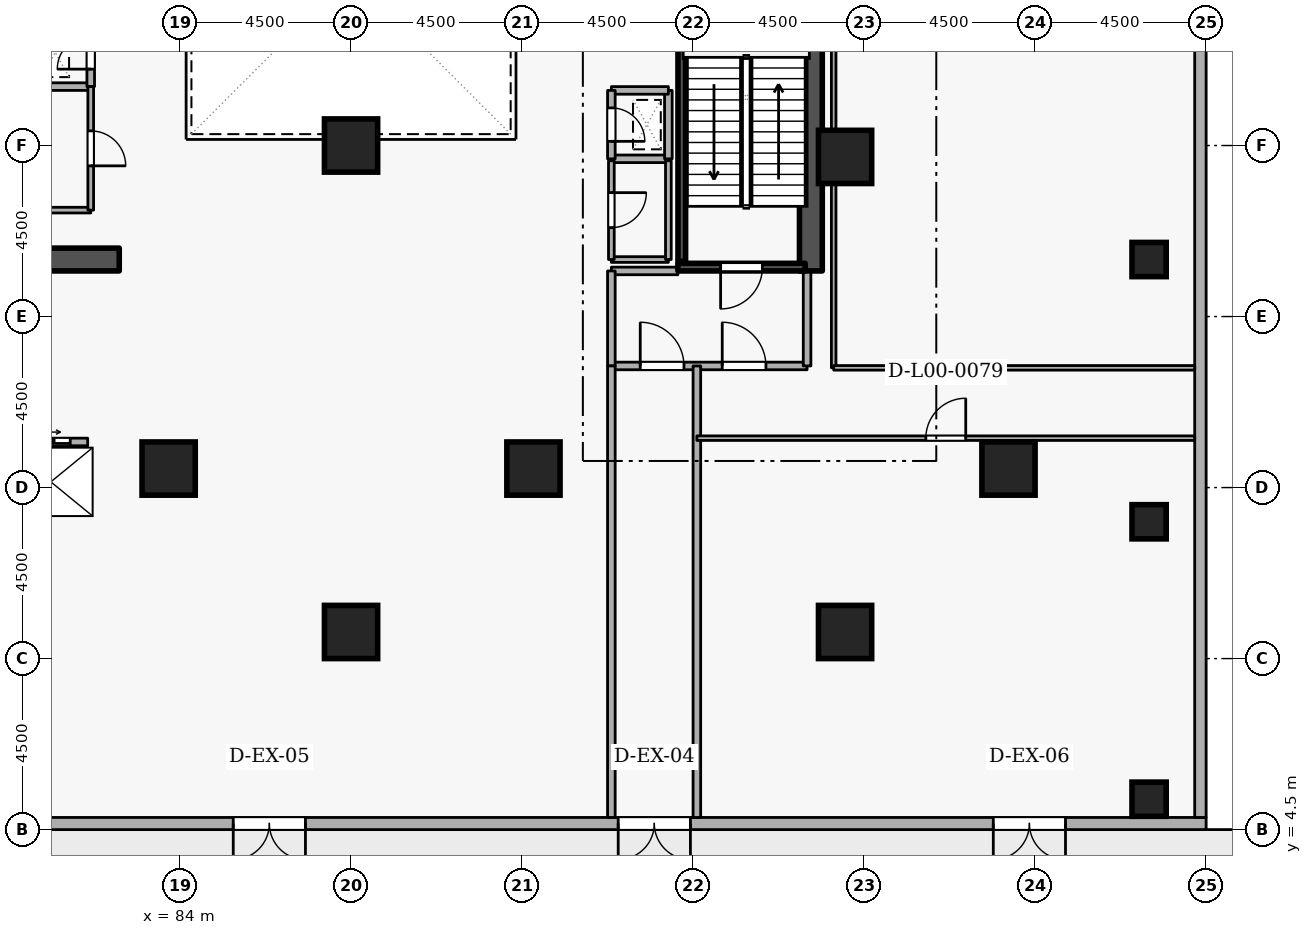
"""IFC4 building model, lengths in metres.
Left out: names, types, materials, properties, quantities, classifications, styles, units other than length and angle.
Written with IfcOpenShell. Run it as: python <this file> out.ifc"""

import sys

from ifc_helpers import new_model, si_unit, direction, frame, frame_2d, origin, origin_2d, place, context, subcontext, project, spatial, rectangle, extrude, element, fill, save


model = new_model("IFC4")
c1 = context("Model", 3, precision=1e-05, world=origin(), true_north=direction((0.0, 1.0)))
c2 = subcontext(c1, "Body", "Model", "MODEL_VIEW")
j1 = project(units=[si_unit("LENGTHUNIT", "METRE"), si_unit("PLANEANGLEUNIT", "RADIAN")], contexts=[c1])
p1 = place(None, origin())
s1 = spatial("IfcSite", under=j1, at=p1, CompositionType="ELEMENT")
p2 = place(p1, origin())
s2 = spatial("IfcBuilding", under=s1, at=p2, CompositionType="ELEMENT")
p3 = place(p2, origin())
s3 = spatial("IfcBuildingStorey", under=s2, at=p3, CompositionType="ELEMENT", Elevation=0.0)
p4 = place(p3, frame((100.6, 19.2, 0.0), z_axis=(0.0, 0.0, 1.0), x_axis=(0.0, 1.0, 0.0)))
e1 = element("IfcWall", 1, at=p4, inside=s3, PredefinedType="SHEAR", context=c2, shape_type="SweptSolid", body=[
    extrude(rectangle(XDim=15.6, YDim=0.6, at=frame_2d((7.8, 0.0))), origin(), (0.0, 0.0, 1.0), 4.8),
])
p5 = place(p3, frame((76.7, 19.5, 0.0), z_axis=(0.0, 0.0, 1.0), x_axis=(1.0, 0.0, 0.0)))
e2 = element("IfcWall", 2, at=p5, inside=s3, PredefinedType="SHEAR", context=c2, shape_type="SweptSolid", body=[
    extrude(rectangle(XDim=5.7, YDim=0.6, at=frame_2d((2.85, 0.0))), origin(), (0.0, 0.0, 1.0), 4.8),
])
for number, where, z_axis, x_axis in (
    (3, (105.8, 14.0, 0.0), (0.0, 0.0, 1.0), (1.0, 0.0, 0.0)),
    (4, (101.5, 9.7, 0.0), (0.0, 0.0, 1.0), (1.0, 0.0, 0.0)),
    (5, (88.5, 9.7, 0.0), (0.0, 0.0, 1.0), (1.0, 0.0, 0.0)),
    (6, (93.3, 14.0, 0.0), (0.0, 0.0, 1.0), (1.0, 0.0, 0.0)),
    (7, (83.7, 14.0, 0.0), (0.0, 0.0, 1.0), (1.0, 0.0, 0.0)),
    (8, (101.5, 22.2, 0.0), (0.0, 0.0, 1.0), (1.0, 0.0, 0.0)),
    (9, (88.5, 22.5, 0.0), (0.0, 0.0, 1.0), (1.0, 0.0, 0.0)),
):
    element("IfcColumn", number, at=place(p3, frame(where, z_axis=z_axis, x_axis=x_axis)), inside=s3, PredefinedType="COLUMN", context=c2, shape_type="SweptSolid", body=[
        extrude(rectangle(XDim=1.4, YDim=1.4, at=origin_2d()), origin(), (0.0, 0.0, 1.0), 4.8),
    ])
for number, where, z_axis, x_axis in (
    (10, (109.5, 5.3, 0.0), (0.0, 0.0, 1.0), (1.0, 0.0, 0.0)),
    (11, (109.5, 12.6, 0.0), (0.0, 0.0, 1.0), (1.0, 0.0, 0.0)),
    (12, (109.5, 19.5, 0.0), (0.0, 0.0, 1.0), (1.0, 0.0, 0.0)),
):
    element("IfcColumn", number, at=place(p3, frame(where, z_axis=z_axis, x_axis=x_axis)), inside=s3, PredefinedType="COLUMN", context=c2, shape_type="SweptSolid", body=[
        extrude(rectangle(XDim=0.9, YDim=0.9, at=origin_2d()), origin(), (0.0, 0.0, 1.0), 4.8),
    ])
p6 = place(p3, frame((71.6, 4.66, 0.0), z_axis=(0.0, 0.0, 1.0), x_axis=(1.0, 0.0, 0.0)))
e13 = element("IfcWall", 13, at=p6, inside=s3, PredefinedType="STANDARD", context=c2, shape_type="SweptSolid", body=[
    extrude(rectangle(XDim=39.4, YDim=0.32, at=frame_2d((19.7, 0.0))), origin(), (0.0, 0.0, 1.0), 3.86),
])
p7 = place(p6, frame((25.83, 0.0, 0.0), z_axis=(0.0, 0.0, 1.0), x_axis=(-1.0, 0.0, 0.0)))
e14 = element("IfcOpeningElement", 14, at=p7, cuts=e13, PredefinedType="OPENING", context=c2, shape_type="SweptSolid", body=[
    extrude(rectangle(XDim=1.9, YDim=2.25, at=frame_2d((0.95, 1.125))), frame((0.0, 0.17, 0.0), z_axis=(0.0, -1.0, 0.0), x_axis=(1.0, 0.0, 0.0)), (0.0, 0.0, 1.0), 0.34),
])
p8 = place(p6, frame((15.7, 0.0, 0.0), z_axis=(0.0, 0.0, 1.0), x_axis=(-1.0, 0.0, 0.0)))
e15 = element("IfcOpeningElement", 15, at=p8, cuts=e13, PredefinedType="OPENING", context=c2, shape_type="SweptSolid", body=[
    extrude(rectangle(XDim=1.9, YDim=2.25, at=frame_2d((0.95, 1.125))), frame((0.0, 0.17, 0.0), z_axis=(0.0, -1.0, 0.0), x_axis=(1.0, 0.0, 0.0)), (0.0, 0.0, 1.0), 0.34),
])
p9 = place(p6, frame((35.7, 0.0, 0.0), z_axis=(0.0, 0.0, 1.0), x_axis=(-1.0, 0.0, 0.0)))
e16 = element("IfcOpeningElement", 16, at=p9, cuts=e13, PredefinedType="OPENING", context=c2, shape_type="SweptSolid", body=[
    extrude(rectangle(XDim=1.9, YDim=2.25, at=frame_2d((0.95, 1.125))), frame((0.0, 0.17, 0.0), z_axis=(0.0, -1.0, 0.0), x_axis=(1.0, 0.0, 0.0)), (0.0, 0.0, 1.0), 0.34),
])
p10 = place(p6, frame((3.0, 0.0, 0.78)))
e17 = element("IfcOpeningElement", 17, at=p10, cuts=e13, PredefinedType="OPENING", context=c2, shape_type="SweptSolid", body=[
    extrude(rectangle(XDim=2.1, YDim=2.4, at=frame_2d((1.05, 1.2))), frame((0.0, 0.17, 0.0), z_axis=(0.0, -1.0, 0.0), x_axis=(1.0, 0.0, 0.0)), (0.0, 0.0, 1.0), 0.34),
])
p11 = place(p3, frame((110.85, 4.82, 0.0), z_axis=(0.0, 0.0, 1.0), x_axis=(0.0, 1.0, 0.0)))
e18 = element("IfcWall", 18, at=p11, inside=s3, PredefinedType="STANDARD", context=c2, shape_type="SweptSolid", body=[
    extrude(rectangle(XDim=44.36, YDim=0.3, at=frame_2d((22.18, 0.0))), origin(), (0.0, 0.0, 1.0), 3.86),
])
p12 = place(p11, frame((22.9, 0.0, 0.0), z_axis=(0.0, 0.0, 1.0), x_axis=(-1.0, 0.0, 0.0)))
e19 = element("IfcOpeningElement", 19, at=p12, cuts=e18, PredefinedType="OPENING", context=c2, shape_type="SweptSolid", body=[
    extrude(rectangle(XDim=1.9, YDim=2.25, at=frame_2d((0.95, 1.125))), frame((0.0, 0.16, 0.0), z_axis=(0.0, -1.0, 0.0), x_axis=(1.0, 0.0, 0.0)), (0.0, 0.0, 1.0), 0.32),
])
p13 = place(p3, frame((79.63, 14.7, 0.0), z_axis=(0.0, 0.0, 1.0), x_axis=(1.0, 0.0, 0.0)))
e20 = element("IfcWall", 20, at=p13, inside=s3, PredefinedType="STANDARD", context=c2, shape_type="SweptSolid", body=[
    extrude(rectangle(XDim=1.94, YDim=0.2, at=frame_2d((0.97, 0.0))), origin(), (0.0, 0.0, 1.0), 4.46),
])
p14 = place(p13, frame((0.46, 0.0, 0.0)))
e21 = element("IfcOpeningElement", 21, at=p14, cuts=e20, PredefinedType="OPENING", context=c2, shape_type="SweptSolid", body=[
    extrude(rectangle(XDim=1.02, YDim=2.06, at=frame_2d((0.51, 1.03))), frame((0.0, 0.11, 0.0), z_axis=(0.0, -1.0, 0.0), x_axis=(1.0, 0.0, 0.0)), (0.0, 0.0, 1.0), 0.22),
])
p15 = place(p3, frame((100.45, 19.3, 0.0), z_axis=(0.0, 0.0, 1.0), x_axis=(-1.0, 0.0, 0.0)))
e22 = element("IfcWall", 22, at=p15, inside=s3, PredefinedType="SHEAR", context=c2, shape_type="SweptSolid", body=[
    extrude(rectangle(XDim=3.35, YDim=0.2, at=frame_2d((1.675, 0.0))), origin(), (0.0, 0.0, 1.0), 4.8),
])
p16 = place(p15, frame((1.125, 0.0, 0.0)))
e23 = element("IfcOpeningElement", 23, at=p16, cuts=e22, PredefinedType="OPENING", context=c2, shape_type="SweptSolid", body=[
    extrude(rectangle(XDim=1.1, YDim=2.1, at=frame_2d((0.55, 1.05))), frame((0.0, 0.11, 0.0), z_axis=(0.0, -1.0, 0.0), x_axis=(1.0, 0.0, 0.0)), (0.0, 0.0, 1.0), 0.22),
])
p17 = place(p3, frame((97.203, 26.55, 0.0), z_axis=(0.0, 0.0, 1.0), x_axis=(0.0, -1.0, 0.0)))
e24 = element("IfcWall", 24, at=p17, inside=s3, PredefinedType="SHEAR", context=c2, shape_type="SweptSolid", body=[
    extrude(rectangle(XDim=7.1, YDim=0.2, at=frame_2d((3.55, 0.0))), origin(), (0.0, 0.0, 1.0), 4.8),
])
p18 = place(p3, frame((95.35, 16.7, 0.0), z_axis=(0.0, 0.0, 1.0), x_axis=(1.0, 0.0, 0.0)))
e25 = element("IfcWall", 25, at=p18, inside=s3, PredefinedType="STANDARD", context=c2, shape_type="SweptSolid", body=[
    extrude(rectangle(XDim=5.15, YDim=0.2, at=frame_2d((2.575, 0.0))), origin(), (0.0, 0.0, 1.0), 4.46),
])
p19 = place(p18, frame((2.917, 0.0, 0.0)))
e26 = element("IfcOpeningElement", 26, at=p19, cuts=e25, PredefinedType="OPENING", context=c2, shape_type="SweptSolid", body=[
    extrude(rectangle(XDim=1.15, YDim=2.1, at=frame_2d((0.575, 1.05))), frame((0.0, 0.11, 0.0), z_axis=(0.0, -1.0, 0.0), x_axis=(1.0, 0.0, 0.0)), (0.0, 0.0, 1.0), 0.22),
])
p20 = place(p18, frame((0.76, 0.0, 0.0)))
e27 = element("IfcOpeningElement", 27, at=p20, cuts=e25, PredefinedType="OPENING", context=c2, shape_type="SweptSolid", body=[
    extrude(rectangle(XDim=1.15, YDim=2.1, at=frame_2d((0.575, 1.05))), frame((0.0, 0.11, 0.0), z_axis=(0.0, -1.0, 0.0), x_axis=(1.0, 0.0, 0.0)), (0.0, 0.0, 1.0), 0.22),
])
p21 = place(p3, frame((100.5, 16.7, 0.0), z_axis=(0.0, 0.0, 1.0), x_axis=(0.0, 1.0, 0.0)))
e28 = element("IfcWall", 28, at=p21, inside=s3, PredefinedType="STANDARD", context=c2, shape_type="SweptSolid", body=[
    extrude(rectangle(XDim=2.5, YDim=0.2, at=frame_2d((1.25, 0.0))), origin(), (0.0, 0.0, 1.0), 4.46),
])
p22 = place(p3, frame((97.1, 19.2, 0.0), z_axis=(0.0, 0.0, 1.0), x_axis=(-1.0, 0.0, 0.0)))
e29 = element("IfcWall", 29, at=p22, inside=s3, PredefinedType="STANDARD", context=c2, shape_type="SweptSolid", body=[
    extrude(rectangle(XDim=1.75, YDim=0.2, at=frame_2d((0.875, 0.0))), origin(), (0.0, 0.0, 1.0), 3.665),
])
p23 = place(p3, frame((95.35, 19.2, 0.0), z_axis=(0.0, 0.0, 1.0), x_axis=(0.0, -1.0, 0.0)))
e30 = element("IfcWall", 30, at=p23, inside=s3, PredefinedType="STANDARD", context=c2, shape_type="SweptSolid", body=[
    extrude(rectangle(XDim=2.5, YDim=0.2, at=frame_2d((1.25, 0.0))), origin(), (0.0, 0.0, 1.0), 4.46),
])
p24 = place(p3, frame((95.35, 22.15, 0.0), z_axis=(0.0, 0.0, 1.0), x_axis=(1.0, 0.0, 0.0)))
e31 = element("IfcWall", 31, at=p24, inside=s3, PredefinedType="STANDARD", context=c2, shape_type="SweptSolid", body=[
    extrude(rectangle(XDim=1.5, YDim=0.2, at=frame_2d((0.75, 0.0))), origin(), (0.0, 0.0, 1.0), 4.46),
])
p25 = place(p3, frame((96.85, 22.15, 0.0), z_axis=(0.0, 0.0, 1.0), x_axis=(0.0, 1.0, 0.0)))
e32 = element("IfcWall", 32, at=p25, inside=s3, PredefinedType="STANDARD", context=c2, shape_type="SweptSolid", body=[
    extrude(rectangle(XDim=1.8, YDim=0.2, at=frame_2d((0.9, 0.0))), origin(), (0.0, 0.0, 1.0), 4.46),
])
p26 = place(p3, frame((96.85, 23.95, 0.0), z_axis=(0.0, 0.0, 1.0), x_axis=(-1.0, 0.0, 0.0)))
e33 = element("IfcWall", 33, at=p26, inside=s3, PredefinedType="STANDARD", context=c2, shape_type="SweptSolid", body=[
    extrude(rectangle(XDim=1.5, YDim=0.2, at=frame_2d((0.75, 0.0))), origin(), (0.0, 0.0, 1.0), 4.46),
])
p27 = place(p3, frame((95.35, 23.95, 0.0), z_axis=(0.0, 0.0, 1.0), x_axis=(0.0, -1.0, 0.0)))
e34 = element("IfcWall", 34, at=p27, inside=s3, PredefinedType="STANDARD", context=c2, shape_type="SweptSolid", body=[
    extrude(rectangle(XDim=1.8, YDim=0.2, at=frame_2d((0.9, 0.0))), origin(), (0.0, 0.0, 1.0), 4.46),
])
p28 = place(p27, frame((0.46, 0.0, 0.0)))
e35 = element("IfcOpeningElement", 35, at=p28, cuts=e34, PredefinedType="OPENING", context=c2, shape_type="SweptSolid", body=[
    extrude(rectangle(XDim=0.88, YDim=2.04, at=frame_2d((0.44, 1.02))), frame((0.0, 0.11, 0.0), z_axis=(0.0, -1.0, 0.0), x_axis=(1.0, 0.0, 0.0)), (0.0, 0.0, 1.0), 0.22),
])
p29 = place(p3, frame((80.15, 24.05, 0.0), z_axis=(0.0, 0.0, 1.0), x_axis=(1.0, 0.0, 0.0)))
e36 = element("IfcWall", 36, at=p29, inside=s3, PredefinedType="STANDARD", context=c2, shape_type="SweptSolid", body=[
    extrude(rectangle(XDim=1.5, YDim=0.2, at=frame_2d((0.75, 0.0))), origin(), (0.0, 0.0, 1.0), 4.46),
])
p30 = place(p3, frame((81.65, 24.05, 0.0), z_axis=(0.0, 0.0, 1.0), x_axis=(0.0, 1.0, 0.0)))
e37 = element("IfcWall", 37, at=p30, inside=s3, PredefinedType="STANDARD", context=c2, shape_type="SweptSolid", body=[
    extrude(rectangle(XDim=1.8, YDim=0.2, at=frame_2d((0.9, 0.0))), origin(), (0.0, 0.0, 1.0), 4.46),
])
p31 = place(p30, frame((0.46, 0.0, 0.0)))
e38 = element("IfcOpeningElement", 38, at=p31, cuts=e37, PredefinedType="OPENING", context=c2, shape_type="SweptSolid", body=[
    extrude(rectangle(XDim=0.88, YDim=2.04, at=frame_2d((0.44, 1.02))), frame((0.0, 0.11, 0.0), z_axis=(0.0, -1.0, 0.0), x_axis=(1.0, 0.0, 0.0)), (0.0, 0.0, 1.0), 0.22),
])
for number, where, z_axis, x_axis in (
    (39, (95.35, 4.82, 0.0), (0.0, 0.0, 1.0), (0.0, 1.0, 0.0)),
    (40, (97.6, 16.7, 0.0), (0.0, 0.0, 1.0), (0.0, -1.0, 0.0)),
):
    element("IfcWall", number, at=place(p3, frame(where, z_axis=z_axis, x_axis=x_axis)), inside=s3, PredefinedType="STANDARD", context=c2, shape_type="SweptSolid", body=[
        extrude(rectangle(XDim=11.88, YDim=0.2, at=frame_2d((5.94, 0.0))), origin(), (0.0, 0.0, 1.0), 4.46),
    ])
p32 = place(p3, frame((95.35, 19.5, 0.0), z_axis=(0.0, 0.0, 1.0), x_axis=(1.0, 0.0, 0.0)))
e41 = element("IfcWall", 41, at=p32, inside=s3, PredefinedType="PARTITIONING", context=c2, shape_type="SweptSolid", body=[
    extrude(rectangle(XDim=1.5, YDim=0.15, at=frame_2d((0.75, 0.0))), origin(), (0.0, 0.0, 1.0), 3.665),
])
p33 = place(p3, frame((96.85, 19.5, 0.0), z_axis=(0.0, 0.0, 1.0), x_axis=(0.0, 1.0, 0.0)))
e42 = element("IfcWall", 42, at=p33, inside=s3, PredefinedType="PARTITIONING", context=c2, shape_type="SweptSolid", body=[
    extrude(rectangle(XDim=2.6, YDim=0.15, at=frame_2d((1.3, 0.0))), origin(), (0.0, 0.0, 1.0), 4.46),
])
p34 = place(p3, frame((95.35, 22.1, 0.0), z_axis=(0.0, 0.0, 1.0), x_axis=(0.0, -1.0, 0.0)))
e43 = element("IfcWall", 43, at=p34, inside=s3, PredefinedType="PARTITIONING", context=c2, shape_type="SweptSolid", body=[
    extrude(rectangle(XDim=2.6, YDim=0.15, at=frame_2d((1.3, 0.0))), origin(), (0.0, 0.0, 1.0), 4.46),
])
p35 = place(p34, frame((0.84, 0.0, 0.0)))
e44 = element("IfcOpeningElement", 44, at=p35, cuts=e43, PredefinedType="OPENING", context=c2, shape_type="SweptSolid", body=[
    extrude(rectangle(XDim=0.92, YDim=2.08, at=frame_2d((0.46, 1.04))), frame((0.0, 0.085, 0.0), z_axis=(0.0, -1.0, 0.0), x_axis=(1.0, 0.0, 0.0)), (0.0, 0.0, 1.0), 0.17),
])
p36 = place(p3, frame((81.65, 20.8, 0.0), z_axis=(0.0, 0.0, 1.0), x_axis=(-1.0, 0.0, 0.0)))
e45 = element("IfcWall", 45, at=p36, inside=s3, PredefinedType="PARTITIONING", context=c2, shape_type="SweptSolid", body=[
    extrude(rectangle(XDim=1.5, YDim=0.15, at=frame_2d((0.75, 0.0))), origin(), (0.0, 0.0, 1.0), 4.46),
])
p37 = place(p3, frame((81.65, 24.05, 0.0), z_axis=(0.0, 0.0, 1.0), x_axis=(0.0, -1.0, 0.0)))
e46 = element("IfcWall", 46, at=p37, inside=s3, PredefinedType="PARTITIONING", context=c2, shape_type="SweptSolid", body=[
    extrude(rectangle(XDim=3.25, YDim=0.15, at=frame_2d((1.625, 0.0))), origin(), (0.0, 0.0, 1.0), 4.46),
])
p38 = place(p37, frame((1.165, 0.0, 0.0)))
e47 = element("IfcOpeningElement", 47, at=p38, cuts=e46, PredefinedType="OPENING", context=c2, shape_type="SweptSolid", body=[
    extrude(rectangle(XDim=0.92, YDim=2.08, at=frame_2d((0.46, 1.04))), frame((0.0, 0.085, 0.0), z_axis=(0.0, -1.0, 0.0), x_axis=(1.0, 0.0, 0.0)), (0.0, 0.0, 1.0), 0.17),
])
p39 = place(p3, frame((97.6, 14.8, 0.0), z_axis=(0.0, 0.0, 1.0), x_axis=(1.0, 0.0, 0.0)))
e48 = element("IfcWall", 48, at=p39, inside=s3, PredefinedType="PARTITIONING", context=c2, shape_type="SweptSolid", body=[
    extrude(rectangle(XDim=13.1, YDim=0.12, at=frame_2d((6.55, 0.0))), origin(), (0.0, 0.0, 1.0), 4.46),
])
p40 = place(p39, frame((6.025, 0.0, 0.0)))
e49 = element("IfcOpeningElement", 49, at=p40, cuts=e48, PredefinedType="OPENING", context=c2, shape_type="SweptSolid", body=[
    extrude(rectangle(XDim=1.05, YDim=2.1, at=frame_2d((0.525, 1.05))), frame((0.0, 0.07, 0.0), z_axis=(0.0, -1.0, 0.0), x_axis=(1.0, 0.0, 0.0)), (0.0, 0.0, 1.0), 0.14),
])
p41 = place(p3, frame((101.2, 16.65, 0.0), z_axis=(0.0, 0.0, 1.0), x_axis=(0.0, 1.0, 0.0)))
e50 = element("IfcWall", 50, at=p41, inside=s3, PredefinedType="PARTITIONING", context=c2, shape_type="SweptSolid", body=[
    extrude(rectangle(XDim=20.65, YDim=0.12, at=frame_2d((10.325, 0.0))), origin(), (0.0, 0.0, 1.0), 4.46),
])
p42 = place(p3, frame((110.7, 16.65, 0.0), z_axis=(0.0, 0.0, 1.0), x_axis=(-1.0, 0.0, 0.0)))
e51 = element("IfcWall", 51, at=p42, inside=s3, PredefinedType="PARTITIONING", context=c2, shape_type="SweptSolid", body=[
    extrude(rectangle(XDim=9.5, YDim=0.12, at=frame_2d((4.75, 0.0))), origin(), (0.0, 0.0, 1.0), 4.46),
])
p43 = place(p7, origin())
e52 = element("IfcDoor", 52, at=p43, inside=s3, OperationType="DOUBLE_DOOR_SINGLE_SWING", PredefinedType="DOOR", context=c2, shape_type="SweptSolid", body=[
    extrude(rectangle(XDim=1.9, YDim=2.25, at=frame_2d((0.95, 1.125))), frame((0.0, 0.025, 0.0), z_axis=(0.0, -1.0, 0.0), x_axis=(1.0, 0.0, 0.0)), (0.0, 0.0, 1.0), 0.05),
])
fill(e14, e52)
p44 = place(p8, origin())
e53 = element("IfcDoor", 53, at=p44, inside=s3, OperationType="DOUBLE_DOOR_SINGLE_SWING", PredefinedType="DOOR", context=c2, shape_type="SweptSolid", body=[
    extrude(rectangle(XDim=1.9, YDim=2.25, at=frame_2d((0.95, 1.125))), frame((0.0, 0.025, 0.0), z_axis=(0.0, -1.0, 0.0), x_axis=(1.0, 0.0, 0.0)), (0.0, 0.0, 1.0), 0.05),
])
fill(e15, e53)
p45 = place(p9, origin())
e54 = element("IfcDoor", 54, at=p45, inside=s3, OperationType="DOUBLE_DOOR_SINGLE_SWING", PredefinedType="DOOR", context=c2, shape_type="SweptSolid", body=[
    extrude(rectangle(XDim=1.9, YDim=2.25, at=frame_2d((0.95, 1.125))), frame((0.0, 0.025, 0.0), z_axis=(0.0, -1.0, 0.0), x_axis=(1.0, 0.0, 0.0)), (0.0, 0.0, 1.0), 0.05),
])
fill(e16, e54)
p46 = place(p14, origin())
e55 = element("IfcDoor", 55, at=p46, inside=s3, OperationType="SLIDING_TO_LEFT", PredefinedType="DOOR", context=c2, shape_type="SweptSolid", body=[
    extrude(rectangle(XDim=1.02, YDim=2.06, at=frame_2d((0.51, 1.03))), frame((0.0, 0.025, 0.0), z_axis=(0.0, -1.0, 0.0), x_axis=(1.0, 0.0, 0.0)), (0.0, 0.0, 1.0), 0.05),
])
fill(e21, e55)
p47 = place(p16, origin())
e56 = element("IfcDoor", 56, at=p47, inside=s3, OperationType="SINGLE_SWING_RIGHT", PredefinedType="DOOR", context=c2, shape_type="SweptSolid", body=[
    extrude(rectangle(XDim=1.1, YDim=2.1, at=frame_2d((0.55, 1.05))), frame((0.0, 0.025, 0.0), z_axis=(0.0, -1.0, 0.0), x_axis=(1.0, 0.0, 0.0)), (0.0, 0.0, 1.0), 0.05),
])
fill(e23, e56)
p48 = place(p19, origin())
e57 = element("IfcDoor", 57, at=p48, inside=s3, OperationType="SINGLE_SWING_LEFT", PredefinedType="DOOR", context=c2, shape_type="SweptSolid", body=[
    extrude(rectangle(XDim=1.15, YDim=2.1, at=frame_2d((0.575, 1.05))), frame((0.0, 0.025, 0.0), z_axis=(0.0, -1.0, 0.0), x_axis=(1.0, 0.0, 0.0)), (0.0, 0.0, 1.0), 0.05),
])
fill(e26, e57)
p49 = place(p28, origin())
e58 = element("IfcDoor", 58, at=p49, inside=s3, OperationType="SINGLE_SWING_RIGHT", PredefinedType="DOOR", context=c2, shape_type="SweptSolid", body=[
    extrude(rectangle(XDim=0.88, YDim=2.04, at=frame_2d((0.44, 1.02))), frame((0.0, 0.025, 0.0), z_axis=(0.0, -1.0, 0.0), x_axis=(1.0, 0.0, 0.0)), (0.0, 0.0, 1.0), 0.05),
])
fill(e35, e58)
p50 = place(p31, origin())
e59 = element("IfcDoor", 59, at=p50, inside=s3, OperationType="SINGLE_SWING_LEFT", PredefinedType="DOOR", context=c2, shape_type="SweptSolid", body=[
    extrude(rectangle(XDim=0.88, YDim=2.04, at=frame_2d((0.44, 1.02))), frame((0.0, 0.025, 0.0), z_axis=(0.0, -1.0, 0.0), x_axis=(1.0, 0.0, 0.0)), (0.0, 0.0, 1.0), 0.05),
])
fill(e38, e59)
p51 = place(p35, origin())
e60 = element("IfcDoor", 60, at=p51, inside=s3, OperationType="SINGLE_SWING_LEFT", PredefinedType="DOOR", context=c2, shape_type="SweptSolid", body=[
    extrude(rectangle(XDim=0.92, YDim=2.08, at=frame_2d((0.46, 1.04))), frame((0.0, 0.025, 0.0), z_axis=(0.0, -1.0, 0.0), x_axis=(1.0, 0.0, 0.0)), (0.0, 0.0, 1.0), 0.05),
])
fill(e44, e60)
p52 = place(p38, origin())
e61 = element("IfcDoor", 61, at=p52, inside=s3, OperationType="SINGLE_SWING_RIGHT", PredefinedType="DOOR", context=c2, shape_type="SweptSolid", body=[
    extrude(rectangle(XDim=0.92, YDim=2.08, at=frame_2d((0.46, 1.04))), frame((0.0, 0.025, 0.0), z_axis=(0.0, -1.0, 0.0), x_axis=(1.0, 0.0, 0.0)), (0.0, 0.0, 1.0), 0.05),
])
fill(e47, e61)
p53 = place(p20, origin())
e62 = element("IfcDoor", 62, at=p53, inside=s3, OperationType="SINGLE_SWING_LEFT", PredefinedType="DOOR", context=c2, shape_type="SweptSolid", body=[
    extrude(rectangle(XDim=1.15, YDim=2.1, at=frame_2d((0.575, 1.05))), frame((0.0, 0.025, 0.0), z_axis=(0.0, -1.0, 0.0), x_axis=(1.0, 0.0, 0.0)), (0.0, 0.0, 1.0), 0.05),
])
fill(e27, e62)
p54 = place(p40, origin())
e63 = element("IfcDoor", 63, at=p54, inside=s3, OperationType="SINGLE_SWING_RIGHT", PredefinedType="DOOR", context=c2, shape_type="SweptSolid", body=[
    extrude(rectangle(XDim=1.05, YDim=2.1, at=frame_2d((0.525, 1.05))), frame((0.0, 0.025, 0.0), z_axis=(0.0, -1.0, 0.0), x_axis=(1.0, 0.0, 0.0)), (0.0, 0.0, 1.0), 0.05),
])
fill(e49, e63)
save(model, sys.argv[1])
